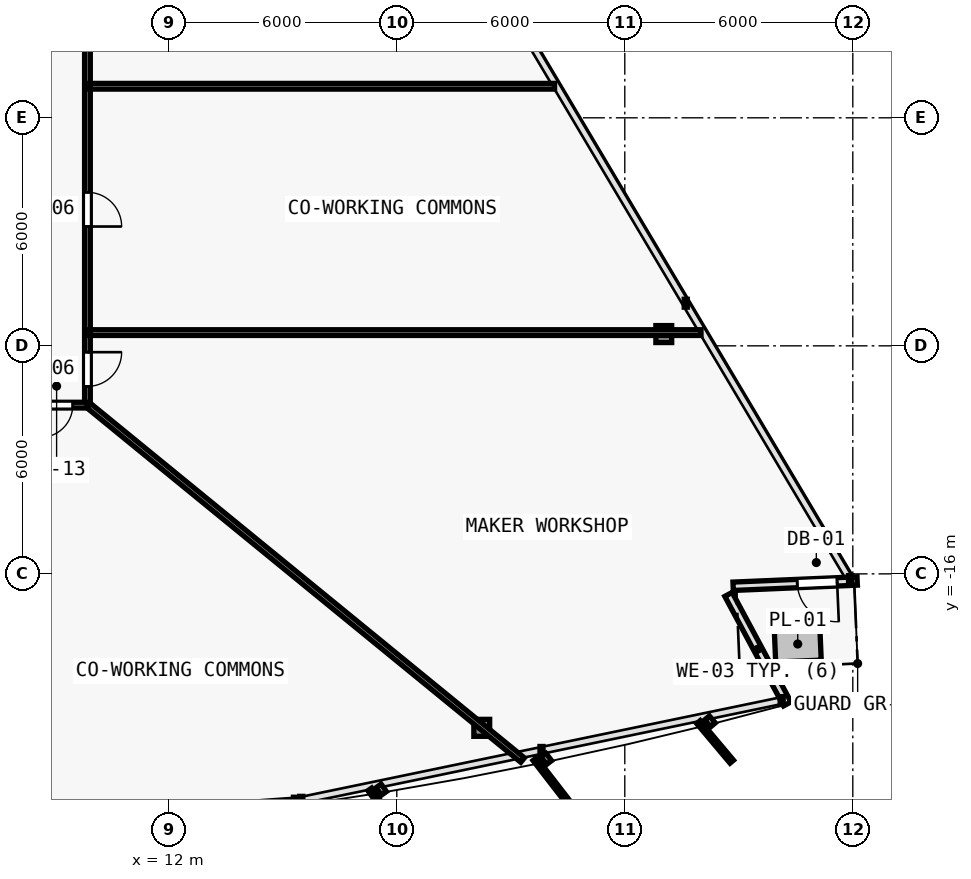
"""IFC4 building model, lengths in metres.
Left out: names, types, materials, properties, quantities, classifications, styles, units other than length and angle.
Written with IfcOpenShell. Run it as: python <this file> out.ifc"""

import sys

from ifc_helpers import new_model, si_unit, direction, frame, frame_2d, origin, origin_2d, place, context, subcontext, project, spatial, rectangle, i_section, extrude, element, fill, save


model = new_model("IFC4")
c1 = context("Model", 3, precision=1e-05, world=origin(), true_north=direction((0.0, 1.0)))
c2 = subcontext(c1, "Body", "Model", "MODEL_VIEW")
j1 = project(units=[si_unit("LENGTHUNIT", "METRE"), si_unit("PLANEANGLEUNIT", "RADIAN")], contexts=[c1])
p1 = place(None, origin())
s1 = spatial("IfcSite", under=j1, at=p1, CompositionType="ELEMENT")
p2 = place(p1, origin())
s2 = spatial("IfcBuilding", under=s1, at=p2, CompositionType="ELEMENT")
p3 = place(p2, frame((0.0, 0.0, 33.6)))
s3 = spatial("IfcBuildingStorey", under=s2, at=p3, CompositionType="ELEMENT", Elevation=33.6)
p4 = place(p3, frame((20.236, -20.051, 0.005), z_axis=(-0.020594893987, 0.033509183946, 0.999226193078), x_axis=(-0.851954850327, -0.523615252838, 0.0)))
e1 = element("IfcColumn", 1, at=p4, inside=s3, PredefinedType="COLUMN", context=c2, shape_type="SweptSolid", body=[
    extrude(i_section(OverallWidth=0.416, OverallDepth=0.446, WebThickness=0.025, FlangeThickness=0.04, FilletRadius=0.015, at=origin_2d()), origin(), (0.0, 0.0, 1.0), 3.592),
])
p5 = place(p3, frame((25.026, -9.69, 0.005), z_axis=(-0.026037763904, 0.021550838532, 0.999428634876), x_axis=(-0.637608877662, -0.770360252821, 0.0)))
e2 = element("IfcColumn", 2, at=p5, inside=s3, PredefinedType="COLUMN", context=c2, shape_type="SweptSolid", body=[
    extrude(i_section(OverallWidth=0.416, OverallDepth=0.446, WebThickness=0.025, FlangeThickness=0.04, FilletRadius=0.015, at=origin_2d()), origin(), (0.0, 0.0, 1.0), 3.591),
])
p6 = place(p3, frame((26.729, -16.54, 0.0), z_axis=(0.0, 0.0, 1.0), x_axis=(0.472830429959, -0.881153439819, 0.0)))
e3 = element("IfcWall", 3, at=p6, inside=s3, PredefinedType="SOLIDWALL", context=c2, shape_type="SweptSolid", body=[
    extrude(rectangle(XDim=3.27, YDim=0.22, at=frame_2d((1.635, 0.0))), origin(), (0.0, 0.0, 1.0), 3.35),
])
p7 = place(p3, frame((30.115, -16.188, 0.0), z_axis=(0.0, 0.0, 1.0), x_axis=(-0.999095638069, -0.042519477791, 0.0)))
e4 = element("IfcWall", 4, at=p7, inside=s3, PredefinedType="SOLIDWALL", context=c2, shape_type="SweptSolid", body=[
    extrude(rectangle(XDim=3.267, YDim=0.22, at=frame_2d((1.634, 0.0))), origin(), (0.0, 0.0, 1.0), 3.35),
])
p8 = place(p7, frame((0.529, 0.0, 0.0)))
e5 = element("IfcOpeningElement", 5, at=p8, cuts=e4, PredefinedType="OPENING", context=c2, shape_type="SweptSolid", body=[
    extrude(rectangle(XDim=1.05, YDim=2.15, at=frame_2d((0.525, 1.075))), frame((0.0, 0.12, 0.0), z_axis=(0.0, -1.0, 0.0), x_axis=(1.0, 0.0, 0.0)), (0.0, 0.0, 1.0), 0.24),
])
p9 = place(p3, frame((9.86, 8.426, 0.0), z_axis=(0.0, 0.0, 1.0), x_axis=(0.0, -1.0, 0.0)))
e6 = element("IfcWall", 6, at=p9, inside=s3, PredefinedType="PARTITIONING", context=c2, shape_type="SweptSolid", body=[
    extrude(rectangle(XDim=19.986, YDim=0.15, at=frame_2d((9.993, 0.0))), origin(), (0.0, 0.0, 1.0), 2.609),
])
p10 = place(p9, frame((18.592, 0.0, 0.0)))
e7 = element("IfcOpeningElement", 7, at=p10, cuts=e6, PredefinedType="OPENING", context=c2, shape_type="SweptSolid", body=[
    extrude(rectangle(XDim=0.9, YDim=2.1, at=frame_2d((0.45, 1.05))), frame((0.0, 0.085, 0.0), z_axis=(0.0, -1.0, 0.0), x_axis=(1.0, 0.0, 0.0)), (0.0, 0.0, 1.0), 0.17),
])
p11 = place(p9, frame((14.386, 0.0, 0.0)))
e8 = element("IfcOpeningElement", 8, at=p11, cuts=e6, PredefinedType="OPENING", context=c2, shape_type="SweptSolid", body=[
    extrude(rectangle(XDim=0.9, YDim=2.1, at=frame_2d((0.45, 1.05))), frame((0.0, 0.085, 0.0), z_axis=(0.0, -1.0, 0.0), x_axis=(1.0, 0.0, 0.0)), (0.0, 0.0, 1.0), 0.17),
])
p12 = place(p9, frame((8.417, 0.0, 0.0)))
e9 = element("IfcOpeningElement", 9, at=p12, cuts=e6, PredefinedType="OPENING", context=c2, shape_type="SweptSolid", body=[
    extrude(rectangle(XDim=0.9, YDim=2.1, at=frame_2d((0.45, 1.05))), frame((0.0, 0.085, 0.0), z_axis=(0.0, -1.0, 0.0), x_axis=(1.0, 0.0, 0.0)), (0.0, 0.0, 1.0), 0.17),
])
p13 = place(p9, frame((2.708, 0.0, 0.0)))
e10 = element("IfcOpeningElement", 10, at=p13, cuts=e6, PredefinedType="OPENING", context=c2, shape_type="SweptSolid", body=[
    extrude(rectangle(XDim=0.9, YDim=2.1, at=frame_2d((0.45, 1.05))), frame((0.0, 0.085, 0.0), z_axis=(0.0, -1.0, 0.0), x_axis=(1.0, 0.0, 0.0)), (0.0, 0.0, 1.0), 0.17),
])
p14 = place(p3, frame((9.86, -11.56, 0.0), z_axis=(0.0, 0.0, 1.0), x_axis=(-1.0, 0.0, 0.0)))
e11 = element("IfcWall", 11, at=p14, inside=s3, PredefinedType="PARTITIONING", context=c2, shape_type="SweptSolid", body=[
    extrude(rectangle(XDim=6.78, YDim=0.15, at=frame_2d((3.39, 0.0))), origin(), (0.0, 0.0, 1.0), 2.609),
])
p15 = place(p14, frame((3.598, 0.0, 0.0)))
e12 = element("IfcOpeningElement", 12, at=p15, cuts=e11, PredefinedType="OPENING", context=c2, shape_type="SweptSolid", body=[
    extrude(rectangle(XDim=0.9, YDim=2.1, at=frame_2d((0.45, 1.05))), frame((0.0, 0.085, 0.0), z_axis=(0.0, -1.0, 0.0), x_axis=(1.0, 0.0, 0.0)), (0.0, 0.0, 1.0), 0.17),
])
p16 = place(p14, frame((0.386, 0.0, 0.0)))
e13 = element("IfcOpeningElement", 13, at=p16, cuts=e11, PredefinedType="OPENING", context=c2, shape_type="SweptSolid", body=[
    extrude(rectangle(XDim=0.85, YDim=2.1, at=frame_2d((0.425, 1.05))), frame((0.0, 0.085, 0.0), z_axis=(0.0, -1.0, 0.0), x_axis=(1.0, 0.0, 0.0)), (0.0, 0.0, 1.0), 0.17),
])
p17 = place(p3, frame((9.888, -11.569, 0.0), z_axis=(0.0, 0.0, 1.0), x_axis=(0.774455620501, -0.632628241446, 0.0)))
e14 = element("IfcWall", 14, at=p17, inside=s3, PredefinedType="PARTITIONING", context=c2, shape_type="SweptSolid", body=[
    extrude(rectangle(XDim=14.749, YDim=0.15, at=frame_2d((7.375, 0.0))), origin(), (0.0, 0.0, 1.0), 2.609),
])
p18 = place(p3, frame((9.92, -9.652, 0.0), z_axis=(0.0, 0.0, 1.0), x_axis=(1.0, 0.0, 0.0)))
e15 = element("IfcWall", 15, at=p18, inside=s3, PredefinedType="PARTITIONING", context=c2, shape_type="SweptSolid", body=[
    extrude(rectangle(XDim=16.086, YDim=0.15, at=frame_2d((8.043, 0.0))), origin(), (0.0, 0.0, 1.0), 2.609),
])
p19 = place(p3, frame((9.92, -3.17, 0.0), z_axis=(0.0, 0.0, 1.0), x_axis=(1.0, 0.0, 0.0)))
e16 = element("IfcWall", 16, at=p19, inside=s3, PredefinedType="PARTITIONING", context=c2, shape_type="SweptSolid", body=[
    extrude(rectangle(XDim=12.231, YDim=0.15, at=frame_2d((6.116, 0.0))), origin(), (0.0, 0.0, 1.0), 2.735),
])
p20 = place(p8, origin())
e17 = element("IfcDoor", 17, at=p20, inside=s3, OperationType="SINGLE_SWING_LEFT", PredefinedType="DOOR", context=c2, shape_type="SweptSolid", body=[
    extrude(rectangle(XDim=1.05, YDim=2.15, at=frame_2d((0.525, 1.075))), frame((0.0, 0.025, 0.0), z_axis=(0.0, -1.0, 0.0), x_axis=(1.0, 0.0, 0.0)), (0.0, 0.0, 1.0), 0.05),
])
fill(e5, e17)
p21 = place(p16, origin())
e18 = element("IfcDoor", 18, at=p21, inside=s3, OperationType="SINGLE_SWING_RIGHT", PredefinedType="DOOR", context=c2, shape_type="SweptSolid", body=[
    extrude(rectangle(XDim=0.85, YDim=2.1, at=frame_2d((0.425, 1.05))), frame((0.0, 0.025, 0.0), z_axis=(0.0, -1.0, 0.0), x_axis=(1.0, 0.0, 0.0)), (0.0, 0.0, 1.0), 0.05),
])
fill(e13, e18)
p22 = place(p10, origin())
e19 = element("IfcDoor", 19, at=p22, inside=s3, OperationType="SINGLE_SWING_LEFT", PredefinedType="DOOR", context=c2, shape_type="SweptSolid", body=[
    extrude(rectangle(XDim=0.9, YDim=2.1, at=frame_2d((0.45, 1.05))), frame((0.0, 0.025, 0.0), z_axis=(0.0, -1.0, 0.0), x_axis=(1.0, 0.0, 0.0)), (0.0, 0.0, 1.0), 0.05),
])
fill(e7, e19)
p23 = place(p11, origin())
e20 = element("IfcDoor", 20, at=p23, inside=s3, OperationType="SINGLE_SWING_RIGHT", PredefinedType="DOOR", context=c2, shape_type="SweptSolid", body=[
    extrude(rectangle(XDim=0.9, YDim=2.1, at=frame_2d((0.45, 1.05))), frame((0.0, 0.025, 0.0), z_axis=(0.0, -1.0, 0.0), x_axis=(1.0, 0.0, 0.0)), (0.0, 0.0, 1.0), 0.05),
])
fill(e8, e20)
save(model, sys.argv[1])
